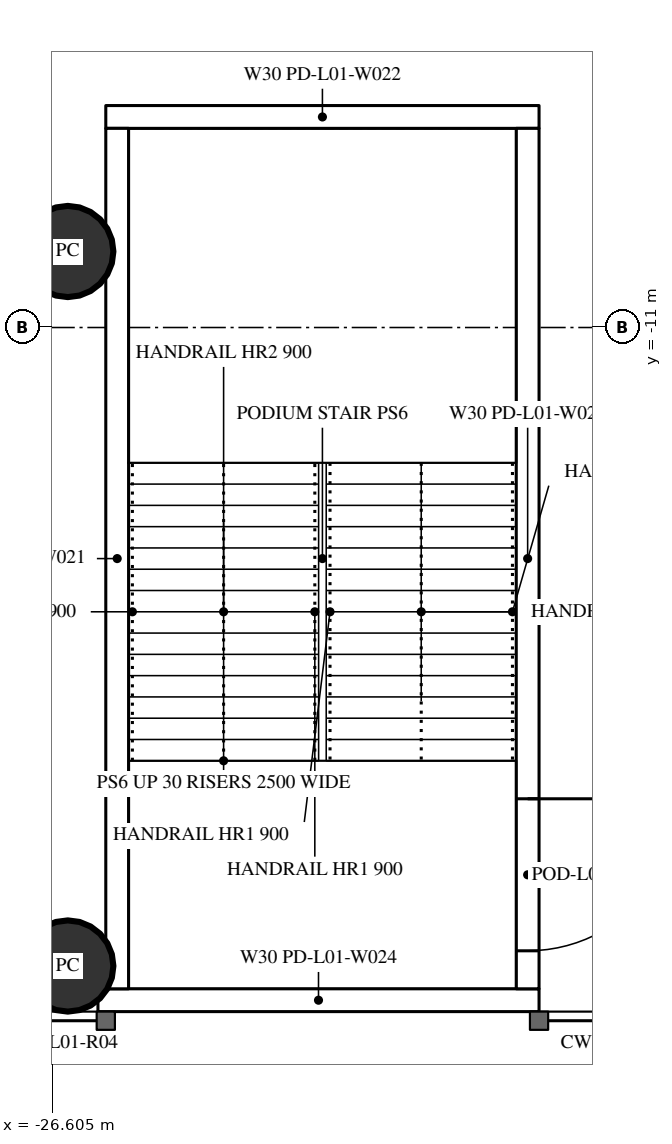
"""IFC4 building model, lengths in metres.
Left out: names, types, materials, properties, quantities, classifications, styles, units other than length and angle.
Written with IfcOpenShell. Run it as: python <this file> out.ifc"""

import sys

from ifc_helpers import new_model, si_unit, direction, frame, frame_2d, origin, origin_2d, place, context, subcontext, project, spatial, rectangle, circle, extrude, element, fill, save


model = new_model("IFC4")
c1 = context("Model", 3, precision=1e-05, world=origin(), true_north=direction((0.0, 1.0)))
c2 = subcontext(c1, "Body", "Model", "MODEL_VIEW")
j1 = project(units=[si_unit("LENGTHUNIT", "METRE"), si_unit("PLANEANGLEUNIT", "RADIAN")], contexts=[c1])
p1 = place(None, origin())
s1 = spatial("IfcSite", under=j1, at=p1, CompositionType="ELEMENT")
p2 = place(p1, origin())
s2 = spatial("IfcBuilding", under=s1, at=p2, CompositionType="ELEMENT")
p3 = place(p2, frame((0.0, 0.0, 7.2)))
s3 = spatial("IfcBuildingStorey", under=s2, at=p3, CompositionType="ELEMENT", Elevation=7.2)
for number, where, z_axis, x_axis in (
    (1, (-26.4, -19.4, 0.0), (0.0, 0.0, 1.0), (1.0, 0.0, 0.0)),
    (2, (-26.4, -10.0, 0.0), (0.0, 0.0, 1.0), (1.0, 0.0, 0.0)),
):
    element("IfcColumn", number, at=place(p3, frame(where, z_axis=z_axis, x_axis=x_axis)), inside=s3, PredefinedType="COLUMN", context=c2, shape_type="SweptSolid", body=[
        extrude(circle(Radius=0.6, at=origin_2d()), origin(), (0.0, 0.0, 1.0), 5.4),
    ])
p4 = place(p3, frame((-20.2, -19.85, 0.0), z_axis=(0.0, 0.0, 1.0), x_axis=(-1.0, 0.0, 0.0)))
e3 = element("IfcWall", 3, at=p4, inside=s3, PredefinedType="SOLIDWALL", context=c2, shape_type="SweptSolid", body=[
    extrude(rectangle(XDim=5.803, YDim=0.3, at=frame_2d((2.902, 0.0))), origin(), (0.0, 0.0, 1.0), 3.55),
])
p5 = place(p3, frame((-25.9, -8.23, 0.0), z_axis=(0.0, 0.0, 1.0), x_axis=(1.0, 0.0, 0.0)))
e4 = element("IfcWall", 4, at=p5, inside=s3, PredefinedType="SOLIDWALL", context=c2, shape_type="SweptSolid", body=[
    extrude(rectangle(XDim=5.7, YDim=0.3, at=frame_2d((2.85, 0.0))), origin(), (0.0, 0.0, 1.0), 5.05),
])
p6 = place(p3, frame((-20.35, -8.38, 0.0), z_axis=(0.0, 0.0, 1.0), x_axis=(0.0, -1.0, 0.0)))
e5 = element("IfcWall", 5, at=p6, inside=s3, PredefinedType="SOLIDWALL", context=c2, shape_type="SweptSolid", body=[
    extrude(rectangle(XDim=11.32, YDim=0.3, at=frame_2d((5.66, 0.0))), origin(), (0.0, 0.0, 1.0), 5.05),
])
p7 = place(p6, frame((8.82, 0.0, 0.0)))
e6 = element("IfcOpeningElement", 6, at=p7, cuts=e5, PredefinedType="OPENING", context=c2, shape_type="SweptSolid", body=[
    extrude(rectangle(XDim=2.0, YDim=2.2, at=frame_2d((1.0, 1.1))), frame((0.0, 0.16, 0.0), z_axis=(0.0, -1.0, 0.0), x_axis=(1.0, 0.0, 0.0)), (0.0, 0.0, 1.0), 0.32),
])
p8 = place(p3, frame((-25.75, -8.38, 0.0), z_axis=(0.0, 0.0, 1.0), x_axis=(0.0, -1.0, 0.0)))
e7 = element("IfcWall", 7, at=p8, inside=s3, PredefinedType="SOLIDWALL", context=c2, shape_type="SweptSolid", body=[
    extrude(rectangle(XDim=11.32, YDim=0.3, at=frame_2d((5.66, 0.0))), origin(), (0.0, 0.0, 1.0), 5.05),
])
p9 = place(p7, origin())
e8 = element("IfcDoor", 8, at=p9, inside=s3, OperationType="DOUBLE_DOOR_SINGLE_SWING", PredefinedType="DOOR", context=c2, shape_type="SweptSolid", body=[
    extrude(rectangle(XDim=2.0, YDim=2.2, at=frame_2d((1.0, 1.1))), frame((0.0, 0.025, 0.0), z_axis=(0.0, -1.0, 0.0), x_axis=(1.0, 0.0, 0.0)), (0.0, 0.0, 1.0), 0.05),
])
fill(e6, e8)
save(model, sys.argv[1])
